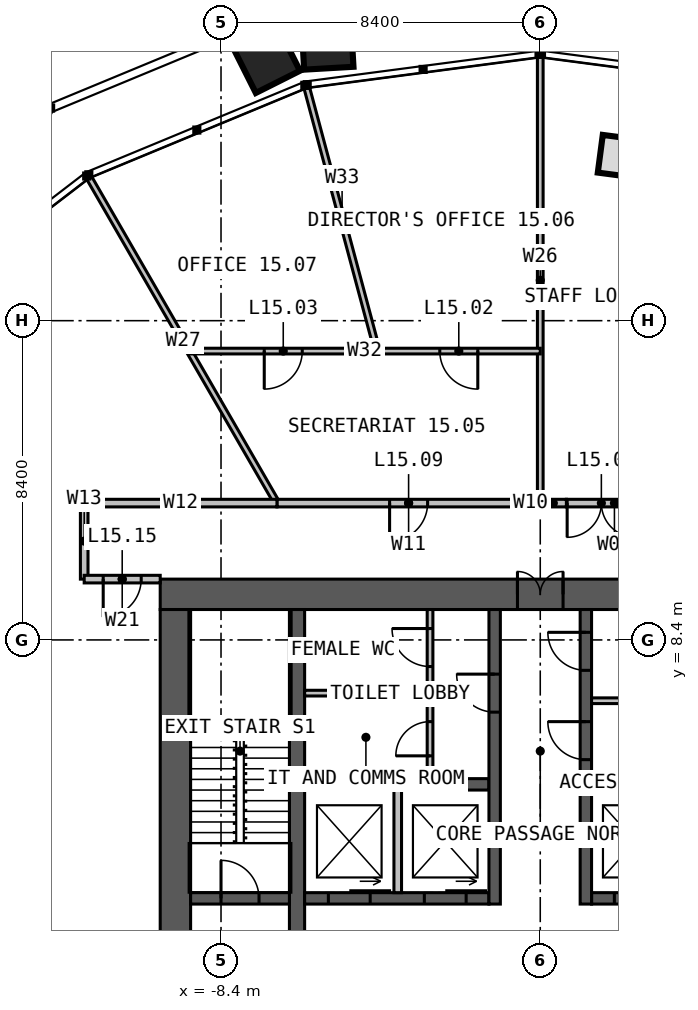
"""IFC4 building model, lengths in metres.
Left out: names, types, materials, properties, quantities, classifications, styles, units other than length and angle.
Written with IfcOpenShell. Run it as: python <this file> out.ifc"""

import sys

from ifc_helpers import new_model, si_unit, direction, frame, frame_2d, origin, place, context, subcontext, project, spatial, rectangle, extrude, element, fill, save


model = new_model("IFC4")
c1 = context("Model", 3, precision=1e-05, world=origin(), true_north=direction((0.0, 1.0)))
c2 = subcontext(c1, "Body", "Model", "MODEL_VIEW")
j1 = project(units=[si_unit("LENGTHUNIT", "METRE"), si_unit("PLANEANGLEUNIT", "RADIAN")], contexts=[c1])
p1 = place(None, origin())
s1 = spatial("IfcSite", under=j1, at=p1, CompositionType="ELEMENT")
p2 = place(p1, origin())
s2 = spatial("IfcBuilding", under=s1, at=p2, CompositionType="ELEMENT")
p3 = place(p2, frame((0.0, 0.0, 65.0)))
s3 = spatial("IfcBuildingStorey", under=s2, at=p3, CompositionType="ELEMENT", Elevation=65.0)
p4 = place(p3, frame((-10.0, 9.6, 0.0), z_axis=(0.0, 0.0, 1.0), x_axis=(1.0, 0.0, 0.0)))
e1 = element("IfcWall", 1, at=p4, inside=s3, PredefinedType="SOLIDWALL", context=c2, shape_type="SweptSolid", body=[
    extrude(rectangle(XDim=20.0, YDim=0.8, at=frame_2d((10.0, 0.0))), origin(), (0.0, 0.0, 1.0), 4.0),
])
p5 = place(p4, frame((9.4, 0.0, 0.0)))
e2 = element("IfcOpeningElement", 2, at=p5, cuts=e1, PredefinedType="OPENING", context=c2, shape_type="SweptSolid", body=[
    extrude(rectangle(XDim=1.2, YDim=2.2, at=frame_2d((0.6, 1.1))), frame((0.0, 0.41, 0.0), z_axis=(0.0, -1.0, 0.0), x_axis=(1.0, 0.0, 0.0)), (0.0, 0.0, 1.0), 0.82),
])
p6 = place(p3, frame((-9.6, 9.2, 0.0), z_axis=(0.0, 0.0, 1.0), x_axis=(0.0, -1.0, 0.0)))
e3 = element("IfcWall", 3, at=p6, inside=s3, PredefinedType="SOLIDWALL", context=c2, shape_type="SweptSolid", body=[
    extrude(rectangle(XDim=18.4, YDim=0.8, at=frame_2d((9.2, 0.0))), origin(), (0.0, 0.0, 1.0), 4.0),
])
p7 = place(p3, frame((-6.4, -9.2, 0.0), z_axis=(0.0, 0.0, 1.0), x_axis=(0.0, 1.0, 0.0)))
e4 = element("IfcWall", 4, at=p7, inside=s3, PredefinedType="SOLIDWALL", context=c2, shape_type="SweptSolid", body=[
    extrude(rectangle(XDim=18.4, YDim=0.4, at=frame_2d((9.2, 0.0))), origin(), (0.0, 0.0, 1.0), 4.0),
])
p8 = place(p7, frame((8.7, 0.0, 0.0)))
e5 = element("IfcOpeningElement", 5, at=p8, cuts=e4, PredefinedType="OPENING", context=c2, shape_type="SweptSolid", body=[
    extrude(rectangle(XDim=1.0, YDim=2.2, at=frame_2d((0.5, 1.1))), frame((0.0, 0.21, 0.0), z_axis=(0.0, -1.0, 0.0), x_axis=(1.0, 0.0, 0.0)), (0.0, 0.0, 1.0), 0.42),
])
p9 = place(p3, frame((-6.2, 1.6, 0.0), z_axis=(0.0, 0.0, 1.0), x_axis=(1.0, 0.0, 0.0)))
e6 = element("IfcWall", 6, at=p9, inside=s3, PredefinedType="SOLIDWALL", context=c2, shape_type="SweptSolid", body=[
    extrude(rectangle(XDim=4.85, YDim=0.3, at=frame_2d((2.425, 0.0))), origin(), (0.0, 0.0, 1.0), 4.0),
])
p10 = place(p9, frame((0.625, 0.0, 0.0)))
e7 = element("IfcOpeningElement", 7, at=p10, cuts=e6, PredefinedType="OPENING", context=c2, shape_type="SweptSolid", body=[
    extrude(rectangle(XDim=1.1, YDim=2.2, at=frame_2d((0.55, 1.1))), frame((0.0, 0.16, 0.0), z_axis=(0.0, -1.0, 0.0), x_axis=(1.0, 0.0, 0.0)), (0.0, 0.0, 1.0), 0.32),
])
p11 = place(p9, frame((3.15, 0.0, 0.0)))
e8 = element("IfcOpeningElement", 8, at=p11, cuts=e6, PredefinedType="OPENING", context=c2, shape_type="SweptSolid", body=[
    extrude(rectangle(XDim=1.1, YDim=2.2, at=frame_2d((0.55, 1.1))), frame((0.0, 0.16, 0.0), z_axis=(0.0, -1.0, 0.0), x_axis=(1.0, 0.0, 0.0)), (0.0, 0.0, 1.0), 0.32),
])
p12 = place(p3, frame((1.35, 1.6, 0.0), z_axis=(0.0, 0.0, 1.0), x_axis=(1.0, 0.0, 0.0)))
e9 = element("IfcWall", 9, at=p12, inside=s3, PredefinedType="SOLIDWALL", context=c2, shape_type="SweptSolid", body=[
    extrude(rectangle(XDim=4.85, YDim=0.3, at=frame_2d((2.425, 0.0))), origin(), (0.0, 0.0, 1.0), 4.0),
])
p13 = place(p12, frame((0.6, 0.0, 0.0)))
e10 = element("IfcOpeningElement", 10, at=p13, cuts=e9, PredefinedType="OPENING", context=c2, shape_type="SweptSolid", body=[
    extrude(rectangle(XDim=1.1, YDim=2.2, at=frame_2d((0.55, 1.1))), frame((0.0, 0.16, 0.0), z_axis=(0.0, -1.0, 0.0), x_axis=(1.0, 0.0, 0.0)), (0.0, 0.0, 1.0), 0.32),
])
p14 = place(p12, frame((3.125, 0.0, 0.0)))
e11 = element("IfcOpeningElement", 11, at=p14, cuts=e9, PredefinedType="OPENING", context=c2, shape_type="SweptSolid", body=[
    extrude(rectangle(XDim=1.1, YDim=2.2, at=frame_2d((0.55, 1.1))), frame((0.0, 0.16, 0.0), z_axis=(0.0, -1.0, 0.0), x_axis=(1.0, 0.0, 0.0)), (0.0, 0.0, 1.0), 0.32),
])
for number, where, z_axis, x_axis in (
    (12, (-6.2, 4.6, 0.0), (0.0, 0.0, 1.0), (1.0, 0.0, 0.0)),
    (13, (1.35, 4.6, 0.0), (0.0, 0.0, 1.0), (1.0, 0.0, 0.0)),
):
    element("IfcWall", number, at=place(p3, frame(where, z_axis=z_axis, x_axis=x_axis)), inside=s3, PredefinedType="SOLIDWALL", context=c2, shape_type="SweptSolid", body=[
        extrude(rectangle(XDim=4.85, YDim=0.3, at=frame_2d((2.425, 0.0))), origin(), (0.0, 0.0, 1.0), 4.0),
    ])
p15 = place(p3, frame((-1.2, 1.45, 0.0), z_axis=(0.0, 0.0, 1.0), x_axis=(0.0, 1.0, 0.0)))
e14 = element("IfcWall", 14, at=p15, inside=s3, PredefinedType="SOLIDWALL", context=c2, shape_type="SweptSolid", body=[
    extrude(rectangle(XDim=7.75, YDim=0.3, at=frame_2d((3.875, 0.0))), origin(), (0.0, 0.0, 1.0), 4.0),
])
p16 = place(p15, frame((5.05, 0.0, 0.0)))
e15 = element("IfcOpeningElement", 15, at=p16, cuts=e14, PredefinedType="OPENING", context=c2, shape_type="SweptSolid", body=[
    extrude(rectangle(XDim=1.0, YDim=2.2, at=frame_2d((0.5, 1.1))), frame((0.0, 0.16, 0.0), z_axis=(0.0, -1.0, 0.0), x_axis=(1.0, 0.0, 0.0)), (0.0, 0.0, 1.0), 0.32),
])
p17 = place(p3, frame((1.2, 1.45, 0.0), z_axis=(0.0, 0.0, 1.0), x_axis=(0.0, 1.0, 0.0)))
e16 = element("IfcWall", 16, at=p17, inside=s3, PredefinedType="SOLIDWALL", context=c2, shape_type="SweptSolid", body=[
    extrude(rectangle(XDim=7.75, YDim=0.3, at=frame_2d((3.875, 0.0))), origin(), (0.0, 0.0, 1.0), 4.0),
])
p18 = place(p17, frame((3.8, 0.0, 0.0)))
e17 = element("IfcOpeningElement", 17, at=p18, cuts=e16, PredefinedType="OPENING", context=c2, shape_type="SweptSolid", body=[
    extrude(rectangle(XDim=1.0, YDim=2.2, at=frame_2d((0.5, 1.1))), frame((0.0, 0.16, 0.0), z_axis=(0.0, -1.0, 0.0), x_axis=(1.0, 0.0, 0.0)), (0.0, 0.0, 1.0), 0.32),
])
p19 = place(p17, frame((6.15, 0.0, 0.0)))
e18 = element("IfcOpeningElement", 18, at=p19, cuts=e16, PredefinedType="OPENING", context=c2, shape_type="SweptSolid", body=[
    extrude(rectangle(XDim=1.0, YDim=2.2, at=frame_2d((0.5, 1.1))), frame((0.0, 0.16, 0.0), z_axis=(0.0, -1.0, 0.0), x_axis=(1.0, 0.0, 0.0)), (0.0, 0.0, 1.0), 0.32),
])
p20 = place(p3, frame((-9.2, 1.6, 0.0), z_axis=(0.0, 0.0, 1.0), x_axis=(1.0, 0.0, 0.0)))
e19 = element("IfcWall", 19, at=p20, inside=s3, PredefinedType="SOLIDWALL", context=c2, shape_type="SweptSolid", body=[
    extrude(rectangle(XDim=2.6, YDim=0.3, at=frame_2d((1.3, 0.0))), origin(), (0.0, 0.0, 1.0), 4.0),
])
p21 = place(p20, frame((0.8, 0.0, 0.0)))
e20 = element("IfcOpeningElement", 20, at=p21, cuts=e19, PredefinedType="OPENING", context=c2, shape_type="SweptSolid", body=[
    extrude(rectangle(XDim=1.0, YDim=2.2, at=frame_2d((0.5, 1.1))), frame((0.0, 0.16, 0.0), z_axis=(0.0, -1.0, 0.0), x_axis=(1.0, 0.0, 0.0)), (0.0, 0.0, 1.0), 0.32),
])
p22 = place(p3, frame((-3.75, 1.75, 0.0), z_axis=(0.0, 0.0, 1.0), x_axis=(0.0, 1.0, 0.0)))
e21 = element("IfcWall", 21, at=p22, inside=s3, PredefinedType="SOLIDWALL", context=c2, shape_type="SweptSolid", body=[
    extrude(rectangle(XDim=2.7, YDim=0.2, at=frame_2d((1.35, 0.0))), origin(), (0.0, 0.0, 1.0), 3.75),
])
p23 = place(p3, frame((1.35, 6.8, 0.0), z_axis=(0.0, 0.0, 1.0), x_axis=(1.0, 0.0, 0.0)))
e22 = element("IfcWall", 22, at=p23, inside=s3, PredefinedType="PARTITIONING", context=c2, shape_type="SweptSolid", body=[
    extrude(rectangle(XDim=4.85, YDim=0.15, at=frame_2d((2.425, 0.0))), origin(), (0.0, 0.0, 1.0), 3.75),
])
p24 = place(p23, frame((3.15, 0.0, 0.0)))
e23 = element("IfcOpeningElement", 23, at=p24, cuts=e22, PredefinedType="OPENING", context=c2, shape_type="SweptSolid", body=[
    extrude(rectangle(XDim=0.9, YDim=2.2, at=frame_2d((0.45, 1.1))), frame((0.0, 0.085, 0.0), z_axis=(0.0, -1.0, 0.0), x_axis=(1.0, 0.0, 0.0)), (0.0, 0.0, 1.0), 0.17),
])
p25 = place(p3, frame((-2.9, 4.75, 0.0), z_axis=(0.0, 0.0, 1.0), x_axis=(0.0, 1.0, 0.0)))
e24 = element("IfcWall", 24, at=p25, inside=s3, PredefinedType="PARTITIONING", context=c2, shape_type="SweptSolid", body=[
    extrude(rectangle(XDim=4.45, YDim=0.15, at=frame_2d((2.225, 0.0))), origin(), (0.0, 0.0, 1.0), 3.75),
])
p26 = place(p25, frame((2.95, 0.0, 0.0)))
e25 = element("IfcOpeningElement", 25, at=p26, cuts=e24, PredefinedType="OPENING", context=c2, shape_type="SweptSolid", body=[
    extrude(rectangle(XDim=1.0, YDim=2.2, at=frame_2d((0.5, 1.1))), frame((0.0, 0.085, 0.0), z_axis=(0.0, -1.0, 0.0), x_axis=(1.0, 0.0, 0.0)), (0.0, 0.0, 1.0), 0.17),
])
p27 = place(p25, frame((0.6, 0.0, 0.0)))
e26 = element("IfcOpeningElement", 26, at=p27, cuts=e24, PredefinedType="OPENING", context=c2, shape_type="SweptSolid", body=[
    extrude(rectangle(XDim=0.9, YDim=2.2, at=frame_2d((0.45, 1.1))), frame((0.0, 0.085, 0.0), z_axis=(0.0, -1.0, 0.0), x_axis=(1.0, 0.0, 0.0)), (0.0, 0.0, 1.0), 0.17),
])
p28 = place(p3, frame((-6.2, 7.0, 0.0), z_axis=(0.0, 0.0, 1.0), x_axis=(1.0, 0.0, 0.0)))
e27 = element("IfcWall", 27, at=p28, inside=s3, PredefinedType="PARTITIONING", context=c2, shape_type="SweptSolid", body=[
    extrude(rectangle(XDim=3.225, YDim=0.15, at=frame_2d((1.612, 0.0))), origin(), (0.0, 0.0, 1.0), 3.75),
])
p29 = place(p3, frame((0.0, 12.0, 0.0), z_axis=(0.0, 0.0, 1.0), x_axis=(0.0, 1.0, 0.0)))
e28 = element("IfcWall", 28, at=p29, inside=s3, PredefinedType="PARTITIONING", context=c2, shape_type="SweptSolid", body=[
    extrude(rectangle(XDim=11.726, YDim=0.15, at=frame_2d((5.863, 0.0))), origin(), (0.0, 0.0, 1.0), 2.79),
])
p30 = place(p3, frame((-6.928, 12.0, 0.0), z_axis=(0.0, 0.0, 1.0), x_axis=(-0.499988678145, 0.866031940362, 0.0)))
e29 = element("IfcWall", 29, at=p30, inside=s3, PredefinedType="PARTITIONING", context=c2, shape_type="SweptSolid", body=[
    extrude(rectangle(XDim=9.87, YDim=0.15, at=frame_2d((4.935, 0.0))), origin(), (0.0, 0.0, 1.0), 2.79),
])
p31 = place(p3, frame((3.215, 12.0, 0.0), z_axis=(0.0, 0.0, 1.0), x_axis=(-1.0, 0.0, 0.0)))
e30 = element("IfcWall", 30, at=p31, inside=s3, PredefinedType="PARTITIONING", context=c2, shape_type="SweptSolid", body=[
    extrude(rectangle(XDim=2.528, YDim=0.2, at=frame_2d((1.264, 0.0))), origin(), (0.0, 0.0, 1.0), 3.2),
])
p32 = place(p31, frame((0.708, 0.0, 0.0)))
e31 = element("IfcOpeningElement", 31, at=p32, cuts=e30, PredefinedType="OPENING", context=c2, shape_type="SweptSolid", body=[
    extrude(rectangle(XDim=1.8, YDim=2.2, at=frame_2d((0.9, 1.1))), frame((0.0, 0.11, 0.0), z_axis=(0.0, -1.0, 0.0), x_axis=(1.0, 0.0, 0.0)), (0.0, 0.0, 1.0), 0.22),
])
p33 = place(p3, frame((0.688, 12.0, 0.0), z_axis=(0.0, 0.0, 1.0), x_axis=(-1.0, 0.0, 0.0)))
e32 = element("IfcWall", 32, at=p33, inside=s3, PredefinedType="PARTITIONING", context=c2, shape_type="SweptSolid", body=[
    extrude(rectangle(XDim=0.688, YDim=0.2, at=frame_2d((0.344, 0.0))), origin(), (0.0, 0.0, 1.0), 3.8),
])
p34 = place(p3, frame((0.0, 16.0, 0.0), z_axis=(0.0, 0.0, 1.0), x_axis=(-1.0, 0.0, 0.0)))
e33 = element("IfcWall", 33, at=p34, inside=s3, PredefinedType="PARTITIONING", context=c2, shape_type="SweptSolid", body=[
    extrude(rectangle(XDim=9.238, YDim=0.15, at=frame_2d((4.619, 0.0))), origin(), (0.0, 0.0, 1.0), 2.79),
])
p35 = place(p34, frame((1.644, 0.0, 0.0)))
e34 = element("IfcOpeningElement", 34, at=p35, cuts=e33, PredefinedType="OPENING", context=c2, shape_type="SweptSolid", body=[
    extrude(rectangle(XDim=1.0, YDim=2.2, at=frame_2d((0.5, 1.1))), frame((0.0, 0.085, 0.0), z_axis=(0.0, -1.0, 0.0), x_axis=(1.0, 0.0, 0.0)), (0.0, 0.0, 1.0), 0.17),
])
p36 = place(p34, frame((6.262, 0.0, 0.0)))
e35 = element("IfcOpeningElement", 35, at=p36, cuts=e33, PredefinedType="OPENING", context=c2, shape_type="SweptSolid", body=[
    extrude(rectangle(XDim=1.0, YDim=2.2, at=frame_2d((0.5, 1.1))), frame((0.0, 0.085, 0.0), z_axis=(0.0, -1.0, 0.0), x_axis=(1.0, 0.0, 0.0)), (0.0, 0.0, 1.0), 0.17),
])
p37 = place(p3, frame((-4.287, 16.0, 0.0), z_axis=(0.0, 0.0, 1.0), x_axis=(-0.258840025144, 0.96592020446, 0.0)))
e36 = element("IfcWall", 36, at=p37, inside=s3, PredefinedType="PARTITIONING", context=c2, shape_type="SweptSolid", body=[
    extrude(rectangle(XDim=7.162, YDim=0.15, at=frame_2d((3.581, 0.0))), origin(), (0.0, 0.0, 1.0), 2.79),
])
p38 = place(p3, frame((0.0, 12.0, 0.0), z_axis=(0.0, 0.0, 1.0), x_axis=(-1.0, 0.0, 0.0)))
e37 = element("IfcWall", 37, at=p38, inside=s3, PredefinedType="PARTITIONING", context=c2, shape_type="SweptSolid", body=[
    extrude(rectangle(XDim=6.928, YDim=0.2, at=frame_2d((3.464, 0.0))), origin(), (0.0, 0.0, 1.0), 3.8),
])
p39 = place(p38, frame((2.964, 0.0, 0.0)))
e38 = element("IfcOpeningElement", 38, at=p39, cuts=e37, PredefinedType="OPENING", context=c2, shape_type="SweptSolid", body=[
    extrude(rectangle(XDim=1.0, YDim=2.2, at=frame_2d((0.5, 1.1))), frame((0.0, 0.11, 0.0), z_axis=(0.0, -1.0, 0.0), x_axis=(1.0, 0.0, 0.0)), (0.0, 0.0, 1.0), 0.22),
])
p40 = place(p3, frame((-6.928, 12.0, 0.0), z_axis=(0.0, 0.0, 1.0), x_axis=(-1.0, 0.0, 0.0)))
e39 = element("IfcWall", 39, at=p40, inside=s3, PredefinedType="PARTITIONING", context=c2, shape_type="SweptSolid", body=[
    extrude(rectangle(XDim=5.072, YDim=0.2, at=frame_2d((2.536, 0.0))), origin(), (0.0, 0.0, 1.0), 3.8),
])
p41 = place(p3, frame((-12.0, 12.0, 0.0), z_axis=(0.0, 0.0, 1.0), x_axis=(0.0, -1.0, 0.0)))
e40 = element("IfcWall", 40, at=p41, inside=s3, PredefinedType="PARTITIONING", context=c2, shape_type="SweptSolid", body=[
    extrude(rectangle(XDim=2.0, YDim=0.2, at=frame_2d((1.0, 0.0))), origin(), (0.0, 0.0, 1.0), 3.8),
])
p42 = place(p3, frame((-10.0, 10.0, 0.0), z_axis=(0.0, 0.0, 1.0), x_axis=(-1.0, 0.0, 0.0)))
e41 = element("IfcWall", 41, at=p42, inside=s3, PredefinedType="PARTITIONING", context=c2, shape_type="SweptSolid", body=[
    extrude(rectangle(XDim=2.0, YDim=0.2, at=frame_2d((1.0, 0.0))), origin(), (0.0, 0.0, 1.0), 3.8),
])
p43 = place(p42, frame((0.5, 0.0, 0.0)))
e42 = element("IfcOpeningElement", 42, at=p43, cuts=e41, PredefinedType="OPENING", context=c2, shape_type="SweptSolid", body=[
    extrude(rectangle(XDim=1.0, YDim=2.2, at=frame_2d((0.5, 1.1))), frame((0.0, 0.11, 0.0), z_axis=(0.0, -1.0, 0.0), x_axis=(1.0, 0.0, 0.0)), (0.0, 0.0, 1.0), 0.22),
])
p44 = place(p5, origin())
e43 = element("IfcDoor", 43, at=p44, inside=s3, OperationType="DOUBLE_DOOR_SINGLE_SWING", PredefinedType="DOOR", context=c2, shape_type="SweptSolid", body=[
    extrude(rectangle(XDim=1.2, YDim=2.2, at=frame_2d((0.6, 1.1))), frame((0.0, 0.025, 0.0), z_axis=(0.0, -1.0, 0.0), x_axis=(1.0, 0.0, 0.0)), (0.0, 0.0, 1.0), 0.05),
])
fill(e2, e43)
p45 = place(p21, origin())
e44 = element("IfcDoor", 44, at=p45, inside=s3, OperationType="SINGLE_SWING_LEFT", PredefinedType="DOOR", context=c2, shape_type="SweptSolid", body=[
    extrude(rectangle(XDim=1.0, YDim=2.2, at=frame_2d((0.5, 1.1))), frame((0.0, 0.025, 0.0), z_axis=(0.0, -1.0, 0.0), x_axis=(1.0, 0.0, 0.0)), (0.0, 0.0, 1.0), 0.05),
])
fill(e20, e44)
p46 = place(p16, origin())
e45 = element("IfcDoor", 45, at=p46, inside=s3, OperationType="SINGLE_SWING_RIGHT", PredefinedType="DOOR", context=c2, shape_type="SweptSolid", body=[
    extrude(rectangle(XDim=1.0, YDim=2.2, at=frame_2d((0.5, 1.1))), frame((0.0, 0.025, 0.0), z_axis=(0.0, -1.0, 0.0), x_axis=(1.0, 0.0, 0.0)), (0.0, 0.0, 1.0), 0.05),
])
fill(e15, e45)
p47 = place(p18, origin())
e46 = element("IfcDoor", 46, at=p47, inside=s3, OperationType="SINGLE_SWING_RIGHT", PredefinedType="DOOR", context=c2, shape_type="SweptSolid", body=[
    extrude(rectangle(XDim=1.0, YDim=2.2, at=frame_2d((0.5, 1.1))), frame((0.0, 0.025, 0.0), z_axis=(0.0, -1.0, 0.0), x_axis=(1.0, 0.0, 0.0)), (0.0, 0.0, 1.0), 0.05),
])
fill(e17, e46)
p48 = place(p19, origin())
e47 = element("IfcDoor", 47, at=p48, inside=s3, OperationType="SINGLE_SWING_RIGHT", PredefinedType="DOOR", context=c2, shape_type="SweptSolid", body=[
    extrude(rectangle(XDim=1.0, YDim=2.2, at=frame_2d((0.5, 1.1))), frame((0.0, 0.025, 0.0), z_axis=(0.0, -1.0, 0.0), x_axis=(1.0, 0.0, 0.0)), (0.0, 0.0, 1.0), 0.05),
])
fill(e18, e47)
p49 = place(p26, origin())
e48 = element("IfcDoor", 48, at=p49, inside=s3, OperationType="SINGLE_SWING_RIGHT", PredefinedType="DOOR", context=c2, shape_type="SweptSolid", body=[
    extrude(rectangle(XDim=1.0, YDim=2.2, at=frame_2d((0.5, 1.1))), frame((0.0, 0.025, 0.0), z_axis=(0.0, -1.0, 0.0), x_axis=(1.0, 0.0, 0.0)), (0.0, 0.0, 1.0), 0.05),
])
fill(e25, e48)
p50 = place(p27, origin())
e49 = element("IfcDoor", 49, at=p50, inside=s3, OperationType="SINGLE_SWING_LEFT", PredefinedType="DOOR", context=c2, shape_type="SweptSolid", body=[
    extrude(rectangle(XDim=0.9, YDim=2.2, at=frame_2d((0.45, 1.1))), frame((0.0, 0.025, 0.0), z_axis=(0.0, -1.0, 0.0), x_axis=(1.0, 0.0, 0.0)), (0.0, 0.0, 1.0), 0.05),
])
fill(e26, e49)
p51 = place(p10, origin())
e50 = element("IfcDoor", 50, at=p51, inside=s3, OperationType="SLIDING_TO_LEFT", PredefinedType="DOOR", context=c2, shape_type="SweptSolid", body=[
    extrude(rectangle(XDim=1.1, YDim=2.2, at=frame_2d((0.55, 1.1))), frame((0.0, 0.025, 0.0), z_axis=(0.0, -1.0, 0.0), x_axis=(1.0, 0.0, 0.0)), (0.0, 0.0, 1.0), 0.05),
])
fill(e7, e50)
p52 = place(p11, origin())
e51 = element("IfcDoor", 51, at=p52, inside=s3, OperationType="SLIDING_TO_LEFT", PredefinedType="DOOR", context=c2, shape_type="SweptSolid", body=[
    extrude(rectangle(XDim=1.1, YDim=2.2, at=frame_2d((0.55, 1.1))), frame((0.0, 0.025, 0.0), z_axis=(0.0, -1.0, 0.0), x_axis=(1.0, 0.0, 0.0)), (0.0, 0.0, 1.0), 0.05),
])
fill(e8, e51)
p53 = place(p13, origin())
e52 = element("IfcDoor", 52, at=p53, inside=s3, OperationType="SLIDING_TO_LEFT", PredefinedType="DOOR", context=c2, shape_type="SweptSolid", body=[
    extrude(rectangle(XDim=1.1, YDim=2.2, at=frame_2d((0.55, 1.1))), frame((0.0, 0.025, 0.0), z_axis=(0.0, -1.0, 0.0), x_axis=(1.0, 0.0, 0.0)), (0.0, 0.0, 1.0), 0.05),
])
fill(e10, e52)
p54 = place(p32, origin())
e53 = element("IfcDoor", 53, at=p54, inside=s3, OperationType="DOUBLE_DOOR_SINGLE_SWING", PredefinedType="DOOR", context=c2, shape_type="SweptSolid", body=[
    extrude(rectangle(XDim=1.8, YDim=2.2, at=frame_2d((0.9, 1.1))), frame((0.0, 0.025, 0.0), z_axis=(0.0, -1.0, 0.0), x_axis=(1.0, 0.0, 0.0)), (0.0, 0.0, 1.0), 0.05),
])
fill(e31, e53)
p55 = place(p35, origin())
e54 = element("IfcDoor", 54, at=p55, inside=s3, OperationType="SINGLE_SWING_LEFT", PredefinedType="DOOR", context=c2, shape_type="SweptSolid", body=[
    extrude(rectangle(XDim=1.0, YDim=2.2, at=frame_2d((0.5, 1.1))), frame((0.0, 0.025, 0.0), z_axis=(0.0, -1.0, 0.0), x_axis=(1.0, 0.0, 0.0)), (0.0, 0.0, 1.0), 0.05),
])
fill(e34, e54)
p56 = place(p36, origin())
e55 = element("IfcDoor", 55, at=p56, inside=s3, OperationType="SINGLE_SWING_RIGHT", PredefinedType="DOOR", context=c2, shape_type="SweptSolid", body=[
    extrude(rectangle(XDim=1.0, YDim=2.2, at=frame_2d((0.5, 1.1))), frame((0.0, 0.025, 0.0), z_axis=(0.0, -1.0, 0.0), x_axis=(1.0, 0.0, 0.0)), (0.0, 0.0, 1.0), 0.05),
])
fill(e35, e55)
p57 = place(p39, origin())
e56 = element("IfcDoor", 56, at=p57, inside=s3, OperationType="SINGLE_SWING_RIGHT", PredefinedType="DOOR", context=c2, shape_type="SweptSolid", body=[
    extrude(rectangle(XDim=1.0, YDim=2.2, at=frame_2d((0.5, 1.1))), frame((0.0, 0.025, 0.0), z_axis=(0.0, -1.0, 0.0), x_axis=(1.0, 0.0, 0.0)), (0.0, 0.0, 1.0), 0.05),
])
fill(e38, e56)
p58 = place(p43, origin())
e57 = element("IfcDoor", 57, at=p58, inside=s3, OperationType="SINGLE_SWING_RIGHT", PredefinedType="DOOR", context=c2, shape_type="SweptSolid", body=[
    extrude(rectangle(XDim=1.0, YDim=2.2, at=frame_2d((0.5, 1.1))), frame((0.0, 0.025, 0.0), z_axis=(0.0, -1.0, 0.0), x_axis=(1.0, 0.0, 0.0)), (0.0, 0.0, 1.0), 0.05),
])
fill(e42, e57)
save(model, sys.argv[1])
